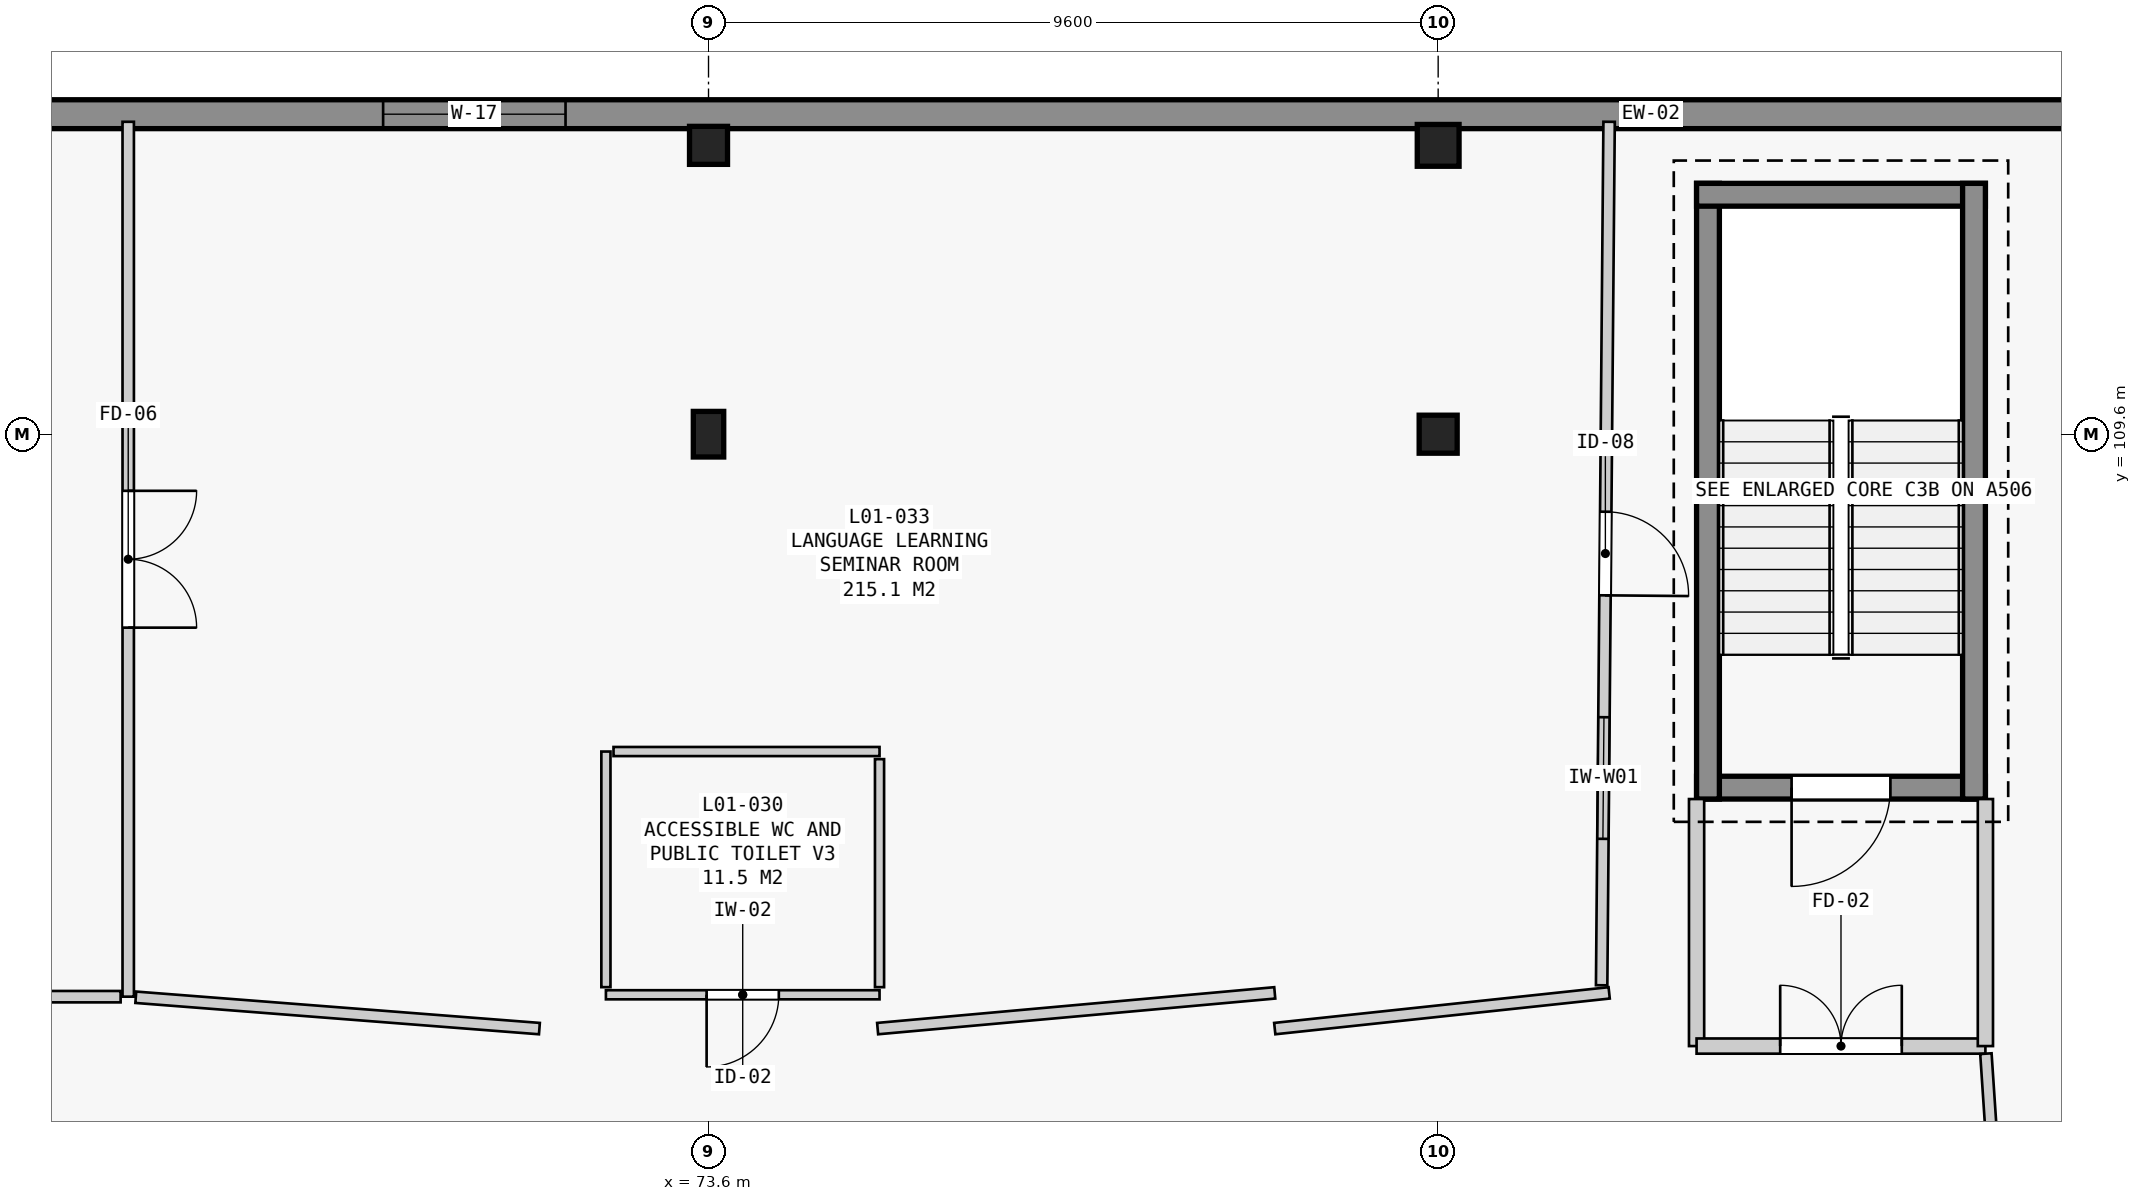
"""IFC4 building model, lengths in metres.
Left out: names, types, materials, properties, quantities, classifications, styles, units other than length and angle.
Written with IfcOpenShell. Run it as: python <this file> out.ifc"""

import sys

from ifc_helpers import new_model, si_unit, direction, frame, frame_2d, origin, origin_2d, place, context, subcontext, project, spatial, rectangle, extrude, element, fill, save


model = new_model("IFC4")
c1 = context("Model", 3, precision=1e-05, world=origin(), true_north=direction((0.0, 1.0)))
c2 = subcontext(c1, "Body", "Model", "MODEL_VIEW")
j1 = project(units=[si_unit("LENGTHUNIT", "METRE"), si_unit("PLANEANGLEUNIT", "RADIAN")], contexts=[c1])
p1 = place(None, origin())
s1 = spatial("IfcSite", under=j1, at=p1, CompositionType="ELEMENT")
p2 = place(p1, origin())
s2 = spatial("IfcBuilding", under=s1, at=p2, CompositionType="ELEMENT")
p3 = place(p2, frame((0.0, 0.0, 5.4)))
s3 = spatial("IfcBuildingStorey", under=s2, at=p3, CompositionType="ELEMENT", Elevation=5.4)
p4 = place(p3, frame((73.6, 109.6, 0.0), z_axis=(0.0, 0.0, 1.0), x_axis=(1.0, 0.0, 0.0)))
e1 = element("IfcColumn", 1, at=p4, inside=s3, PredefinedType="COLUMN", context=c2, shape_type="SweptSolid", body=[
    extrude(rectangle(XDim=0.4, YDim=0.6, at=origin_2d()), origin(), (0.0, 0.0, 1.0), 4.2),
])
for number, where, z_axis, x_axis in (
    (2, (73.6, 113.4, 0.0), (0.0, 0.0, 1.0), (1.0, 0.0, 0.0)),
    (3, (83.2, 109.6, 0.0), (0.0, 0.0, 1.0), (1.0, 0.0, 0.0)),
):
    element("IfcColumn", number, at=place(p3, frame(where, z_axis=z_axis, x_axis=x_axis)), inside=s3, PredefinedType="COLUMN", context=c2, shape_type="SweptSolid", body=[
        extrude(rectangle(XDim=0.5, YDim=0.5, at=origin_2d()), origin(), (0.0, 0.0, 1.0), 4.2),
    ])
p5 = place(p3, frame((83.2, 113.4, 0.0), z_axis=(0.0, 0.0, 1.0), x_axis=(1.0, 0.0, 0.0)))
e4 = element("IfcColumn", 4, at=p5, inside=s3, PredefinedType="COLUMN", context=c2, shape_type="SweptSolid", body=[
    extrude(rectangle(XDim=0.55, YDim=0.55, at=origin_2d()), origin(), (0.0, 0.0, 1.0), 4.2),
])
p6 = place(p3, frame((46.29, 113.81, 0.0), z_axis=(0.0, 0.0, 1.0), x_axis=(1.0, 0.0, 0.0)))
e5 = element("IfcWall", 5, at=p6, inside=s3, PredefinedType="STANDARD", context=c2, shape_type="SweptSolid", body=[
    extrude(rectangle(XDim=78.32, YDim=0.38, at=frame_2d((39.16, 0.0))), origin(), (0.0, 0.0, 1.0), 3.92),
])
p7 = place(p6, frame((23.029, 0.0, 1.65)))
e6 = element("IfcOpeningElement", 6, at=p7, cuts=e5, PredefinedType="OPENING", context=c2, shape_type="SweptSolid", body=[
    extrude(rectangle(XDim=2.4, YDim=1.8, at=frame_2d((1.2, 0.9))), frame((0.0, 0.2, 0.0), z_axis=(0.0, -1.0, 0.0), x_axis=(1.0, 0.0, 0.0)), (0.0, 0.0, 1.0), 0.4),
])
p8 = place(p6, frame((50.866, 0.0, 1.05)))
e7 = element("IfcOpeningElement", 7, at=p8, cuts=e5, PredefinedType="OPENING", context=c2, shape_type="SweptSolid", body=[
    extrude(rectangle(XDim=1.65, YDim=2.2, at=frame_2d((0.825, 1.1))), frame((0.0, 0.2, 0.0), z_axis=(0.0, -1.0, 0.0), x_axis=(1.0, 0.0, 0.0)), (0.0, 0.0, 1.0), 0.4),
])
p9 = place(p3, frame((90.4, 104.95, 0.0), z_axis=(0.0, 0.0, 1.0), x_axis=(-1.0, 0.0, 0.0)))
e8 = element("IfcWall", 8, at=p9, inside=s3, PredefinedType="SHEAR", context=c2, shape_type="SweptSolid", body=[
    extrude(rectangle(XDim=3.8, YDim=0.3, at=frame_2d((1.9, 0.0))), origin(), (0.0, 0.0, 1.0), 3.92),
])
p10 = place(p9, frame((1.25, 0.0, 0.0)))
e9 = element("IfcOpeningElement", 9, at=p10, cuts=e8, PredefinedType="OPENING", context=c2, shape_type="SweptSolid", body=[
    extrude(rectangle(XDim=1.3, YDim=2.2, at=frame_2d((0.65, 1.1))), frame((0.0, 0.16, 0.0), z_axis=(0.0, -1.0, 0.0), x_axis=(1.0, 0.0, 0.0)), (0.0, 0.0, 1.0), 0.32),
])
p11 = place(p3, frame((86.75, 104.8, 0.0), z_axis=(0.0, 0.0, 1.0), x_axis=(0.0, 1.0, 0.0)))
e10 = element("IfcWall", 10, at=p11, inside=s3, PredefinedType="SHEAR", context=c2, shape_type="SweptSolid", body=[
    extrude(rectangle(XDim=8.1, YDim=0.3, at=frame_2d((4.05, 0.0))), origin(), (0.0, 0.0, 1.0), 3.92),
])
p12 = place(p3, frame((86.6, 112.75, 0.0), z_axis=(0.0, 0.0, 1.0), x_axis=(1.0, 0.0, 0.0)))
e11 = element("IfcWall", 11, at=p12, inside=s3, PredefinedType="SHEAR", context=c2, shape_type="SweptSolid", body=[
    extrude(rectangle(XDim=3.8, YDim=0.3, at=frame_2d((1.9, 0.0))), origin(), (0.0, 0.0, 1.0), 3.92),
])
p13 = place(p3, frame((90.25, 112.9, 0.0), z_axis=(0.0, 0.0, 1.0), x_axis=(0.0, -1.0, 0.0)))
e12 = element("IfcWall", 12, at=p13, inside=s3, PredefinedType="SHEAR", context=c2, shape_type="SweptSolid", body=[
    extrude(rectangle(XDim=8.1, YDim=0.3, at=frame_2d((4.05, 0.0))), origin(), (0.0, 0.0, 1.0), 3.92),
])
p14 = place(p3, frame((86.6, 104.8, 0.0), z_axis=(0.0, 0.0, 1.0), x_axis=(0.0, -1.0, 0.0)))
e13 = element("IfcWall", 13, at=p14, inside=s3, PredefinedType="STANDARD", context=c2, shape_type="SweptSolid", body=[
    extrude(rectangle(XDim=3.25, YDim=0.2, at=frame_2d((1.625, 0.0))), origin(), (0.0, 0.0, 1.0), 3.92),
])
p15 = place(p3, frame((86.6, 101.55, 0.0), z_axis=(0.0, 0.0, 1.0), x_axis=(1.0, 0.0, 0.0)))
e14 = element("IfcWall", 14, at=p15, inside=s3, PredefinedType="STANDARD", context=c2, shape_type="SweptSolid", body=[
    extrude(rectangle(XDim=3.8, YDim=0.2, at=frame_2d((1.9, 0.0))), origin(), (0.0, 0.0, 1.0), 3.92),
])
p16 = place(p15, frame((1.1, 0.0, 0.0)))
e15 = element("IfcOpeningElement", 15, at=p16, cuts=e14, PredefinedType="OPENING", context=c2, shape_type="SweptSolid", body=[
    extrude(rectangle(XDim=1.6, YDim=2.2, at=frame_2d((0.8, 1.1))), frame((0.0, 0.11, 0.0), z_axis=(0.0, -1.0, 0.0), x_axis=(1.0, 0.0, 0.0)), (0.0, 0.0, 1.0), 0.22),
])
p17 = place(p3, frame((90.4, 101.55, 0.0), z_axis=(0.0, 0.0, 1.0), x_axis=(0.0, 1.0, 0.0)))
e16 = element("IfcWall", 16, at=p17, inside=s3, PredefinedType="STANDARD", context=c2, shape_type="SweptSolid", body=[
    extrude(rectangle(XDim=3.25, YDim=0.2, at=frame_2d((1.625, 0.0))), origin(), (0.0, 0.0, 1.0), 3.92),
])
p18 = place(p3, frame((75.85, 102.225, 0.0), z_axis=(0.0, 0.0, 1.0), x_axis=(-1.0, 0.0, 0.0)))
e17 = element("IfcWall", 17, at=p18, inside=s3, PredefinedType="PARTITIONING", context=c2, shape_type="SweptSolid", body=[
    extrude(rectangle(XDim=3.6, YDim=0.12, at=frame_2d((1.8, 0.0))), origin(), (0.0, 0.0, 1.0), 3.2),
])
p19 = place(p18, frame((1.325, 0.0, 0.0)))
e18 = element("IfcOpeningElement", 18, at=p19, cuts=e17, PredefinedType="OPENING", context=c2, shape_type="SweptSolid", body=[
    extrude(rectangle(XDim=0.95, YDim=2.15, at=frame_2d((0.475, 1.075))), frame((0.0, 0.07, 0.0), z_axis=(0.0, -1.0, 0.0), x_axis=(1.0, 0.0, 0.0)), (0.0, 0.0, 1.0), 0.14),
])
p20 = place(p3, frame((72.25, 102.325, 0.0), z_axis=(0.0, 0.0, 1.0), x_axis=(0.0, 1.0, 0.0)))
e19 = element("IfcWall", 19, at=p20, inside=s3, PredefinedType="PARTITIONING", context=c2, shape_type="SweptSolid", body=[
    extrude(rectangle(XDim=3.1, YDim=0.12, at=frame_2d((1.55, 0.0))), origin(), (0.0, 0.0, 1.0), 3.92),
])
p21 = place(p3, frame((72.35, 105.425, 0.0), z_axis=(0.0, 0.0, 1.0), x_axis=(1.0, 0.0, 0.0)))
e20 = element("IfcWall", 20, at=p21, inside=s3, PredefinedType="PARTITIONING", context=c2, shape_type="SweptSolid", body=[
    extrude(rectangle(XDim=3.5, YDim=0.12, at=frame_2d((1.75, 0.0))), origin(), (0.0, 0.0, 1.0), 3.2),
])
p22 = place(p3, frame((75.85, 105.325, 0.0), z_axis=(0.0, 0.0, 1.0), x_axis=(0.0, -1.0, 0.0)))
e21 = element("IfcWall", 21, at=p22, inside=s3, PredefinedType="PARTITIONING", context=c2, shape_type="SweptSolid", body=[
    extrude(rectangle(XDim=3.0, YDim=0.12, at=frame_2d((1.5, 0.0))), origin(), (0.0, 0.0, 1.0), 3.92),
])
p23 = place(p3, frame((65.965, 113.71, 0.0), z_axis=(0.0, 0.0, 1.0), x_axis=(0.0, -1.0, 0.0)))
e22 = element("IfcWall", 22, at=p23, inside=s3, PredefinedType="PARTITIONING", context=c2, shape_type="SweptSolid", body=[
    extrude(rectangle(XDim=11.51, YDim=0.15, at=frame_2d((5.755, 0.0))), origin(), (0.0, 0.0, 1.0), 2.715),
])
p24 = place(p23, frame((4.855, 0.0, 0.0)))
e23 = element("IfcOpeningElement", 23, at=p24, cuts=e22, PredefinedType="OPENING", context=c2, shape_type="SweptSolid", body=[
    extrude(rectangle(XDim=1.8, YDim=2.2, at=frame_2d((0.9, 1.1))), frame((0.0, 0.085, 0.0), z_axis=(0.0, -1.0, 0.0), x_axis=(1.0, 0.0, 0.0)), (0.0, 0.0, 1.0), 0.17),
])
p25 = place(p3, frame((65.865, 102.2, 0.0), z_axis=(0.0, 0.0, 1.0), x_axis=(-1.0, 0.0, 0.0)))
e24 = element("IfcWall", 24, at=p25, inside=s3, PredefinedType="PARTITIONING", context=c2, shape_type="SweptSolid", body=[
    extrude(rectangle(XDim=4.365, YDim=0.15, at=frame_2d((2.183, 0.0))), origin(), (0.0, 0.0, 1.0), 3.2),
])
p26 = place(p3, frame((85.45, 102.25, 0.0), z_axis=(0.0, 0.0, 1.0), x_axis=(-0.994343750251, -0.106209728068, 0.0)))
e25 = element("IfcWall", 25, at=p26, inside=s3, PredefinedType="PARTITIONING", context=c2, shape_type="SweptSolid", body=[
    extrude(rectangle(XDim=4.425, YDim=0.15, at=frame_2d((2.212, 0.0))), origin(), (0.0, 0.0, 1.0), 3.2),
])
p27 = place(p3, frame((81.05, 102.25, 0.0), z_axis=(0.0, 0.0, 1.0), x_axis=(-0.995979339845, -0.089583227231, 0.0)))
e26 = element("IfcWall", 26, at=p27, inside=s3, PredefinedType="PARTITIONING", context=c2, shape_type="SweptSolid", body=[
    extrude(rectangle(XDim=5.246, YDim=0.15, at=frame_2d((2.623, 0.0))), origin(), (0.0, 0.0, 1.0), 3.45),
])
p28 = place(p3, frame((71.375, 101.78, 0.0), z_axis=(0.0, 0.0, 1.0), x_axis=(-0.996998680489, 0.077418544956, 0.0)))
e27 = element("IfcWall", 27, at=p28, inside=s3, PredefinedType="PARTITIONING", context=c2, shape_type="SweptSolid", body=[
    extrude(rectangle(XDim=5.326, YDim=0.15, at=frame_2d((2.663, 0.0))), origin(), (0.0, 0.0, 1.0), 3.45),
])
p29 = place(p3, frame((85.449, 113.71, 0.0), z_axis=(0.0, 0.0, 1.0), x_axis=(-0.00866075404, -0.999962494966, 0.0)))
e28 = element("IfcWall", 28, at=p29, inside=s3, PredefinedType="PARTITIONING", context=c2, shape_type="SweptSolid", body=[
    extrude(rectangle(XDim=11.36, YDim=0.15, at=frame_2d((5.68, 0.0))), origin(), (0.0, 0.0, 1.0), 3.15),
])
p30 = place(p29, frame((5.13, 0.0, 0.0)))
e29 = element("IfcOpeningElement", 29, at=p30, cuts=e28, PredefinedType="OPENING", context=c2, shape_type="SweptSolid", body=[
    extrude(rectangle(XDim=1.1, YDim=2.2, at=frame_2d((0.55, 1.1))), frame((0.0, 0.085, 0.0), z_axis=(0.0, -1.0, 0.0), x_axis=(1.0, 0.0, 0.0)), (0.0, 0.0, 1.0), 0.17),
])
p31 = place(p29, frame((7.834, 0.0, 1.05)))
e30 = element("IfcOpeningElement", 30, at=p31, cuts=e28, PredefinedType="OPENING", context=c2, shape_type="SweptSolid", body=[
    extrude(rectangle(XDim=1.6, YDim=1.5, at=frame_2d((0.8, 0.75))), frame((0.0, 0.085, 0.0), z_axis=(0.0, -1.0, 0.0), x_axis=(1.0, 0.0, 0.0)), (0.0, 0.0, 1.0), 0.17),
])
p32 = place(p3, frame((90.593, 98.65, 0.0), z_axis=(0.0, 0.0, 1.0), x_axis=(-0.066461272894, 0.997789005354, 0.0)))
e31 = element("IfcWall", 31, at=p32, inside=s3, PredefinedType="PARTITIONING", context=c2, shape_type="SweptSolid", body=[
    extrude(rectangle(XDim=2.806, YDim=0.15, at=frame_2d((1.403, 0.0))), origin(), (0.0, 0.0, 1.0), 3.25),
])
p33 = place(p7, origin())
e32 = element("IfcWindow", 32, at=p33, inside=s3, PartitioningType="SINGLE_PANEL", PredefinedType="WINDOW", context=c2, shape_type="SweptSolid", body=[
    extrude(rectangle(XDim=2.4, YDim=1.8, at=frame_2d((1.2, 0.9))), frame((0.0, 0.03, 0.0), z_axis=(0.0, -1.0, 0.0), x_axis=(1.0, 0.0, 0.0)), (0.0, 0.0, 1.0), 0.06),
])
fill(e6, e32)
p34 = place(p10, origin())
e33 = element("IfcDoor", 33, at=p34, inside=s3, OperationType="SINGLE_SWING_RIGHT", PredefinedType="DOOR", context=c2, shape_type="SweptSolid", body=[
    extrude(rectangle(XDim=1.3, YDim=2.2, at=frame_2d((0.65, 1.1))), frame((0.0, 0.025, 0.0), z_axis=(0.0, -1.0, 0.0), x_axis=(1.0, 0.0, 0.0)), (0.0, 0.0, 1.0), 0.05),
])
fill(e9, e33)
p35 = place(p16, origin())
e34 = element("IfcDoor", 34, at=p35, inside=s3, OperationType="DOUBLE_DOOR_SINGLE_SWING", PredefinedType="DOOR", context=c2, shape_type="SweptSolid", body=[
    extrude(rectangle(XDim=1.6, YDim=2.2, at=frame_2d((0.8, 1.1))), frame((0.0, 0.025, 0.0), z_axis=(0.0, -1.0, 0.0), x_axis=(1.0, 0.0, 0.0)), (0.0, 0.0, 1.0), 0.05),
])
fill(e15, e34)
p36 = place(p19, origin())
e35 = element("IfcDoor", 35, at=p36, inside=s3, OperationType="SINGLE_SWING_RIGHT", PredefinedType="DOOR", context=c2, shape_type="SweptSolid", body=[
    extrude(rectangle(XDim=0.95, YDim=2.15, at=frame_2d((0.475, 1.075))), frame((0.0, 0.025, 0.0), z_axis=(0.0, -1.0, 0.0), x_axis=(1.0, 0.0, 0.0)), (0.0, 0.0, 1.0), 0.05),
])
fill(e18, e35)
p37 = place(p24, origin())
e36 = element("IfcDoor", 36, at=p37, inside=s3, OperationType="DOUBLE_DOOR_SINGLE_SWING", PredefinedType="DOOR", context=c2, shape_type="SweptSolid", body=[
    extrude(rectangle(XDim=1.8, YDim=2.2, at=frame_2d((0.9, 1.1))), frame((0.0, 0.025, 0.0), z_axis=(0.0, -1.0, 0.0), x_axis=(1.0, 0.0, 0.0)), (0.0, 0.0, 1.0), 0.05),
])
fill(e23, e36)
p38 = place(p30, origin())
e37 = element("IfcDoor", 37, at=p38, inside=s3, OperationType="SINGLE_SWING_RIGHT", PredefinedType="DOOR", context=c2, shape_type="SweptSolid", body=[
    extrude(rectangle(XDim=1.1, YDim=2.2, at=frame_2d((0.55, 1.1))), frame((0.0, 0.025, 0.0), z_axis=(0.0, -1.0, 0.0), x_axis=(1.0, 0.0, 0.0)), (0.0, 0.0, 1.0), 0.05),
])
fill(e29, e37)
p39 = place(p31, origin())
e38 = element("IfcWindow", 38, at=p39, inside=s3, PartitioningType="SINGLE_PANEL", PredefinedType="WINDOW", context=c2, shape_type="SweptSolid", body=[
    extrude(rectangle(XDim=1.6, YDim=1.5, at=frame_2d((0.8, 0.75))), frame((0.0, 0.03, 0.0), z_axis=(0.0, -1.0, 0.0), x_axis=(1.0, 0.0, 0.0)), (0.0, 0.0, 1.0), 0.06),
])
fill(e30, e38)
save(model, sys.argv[1])
